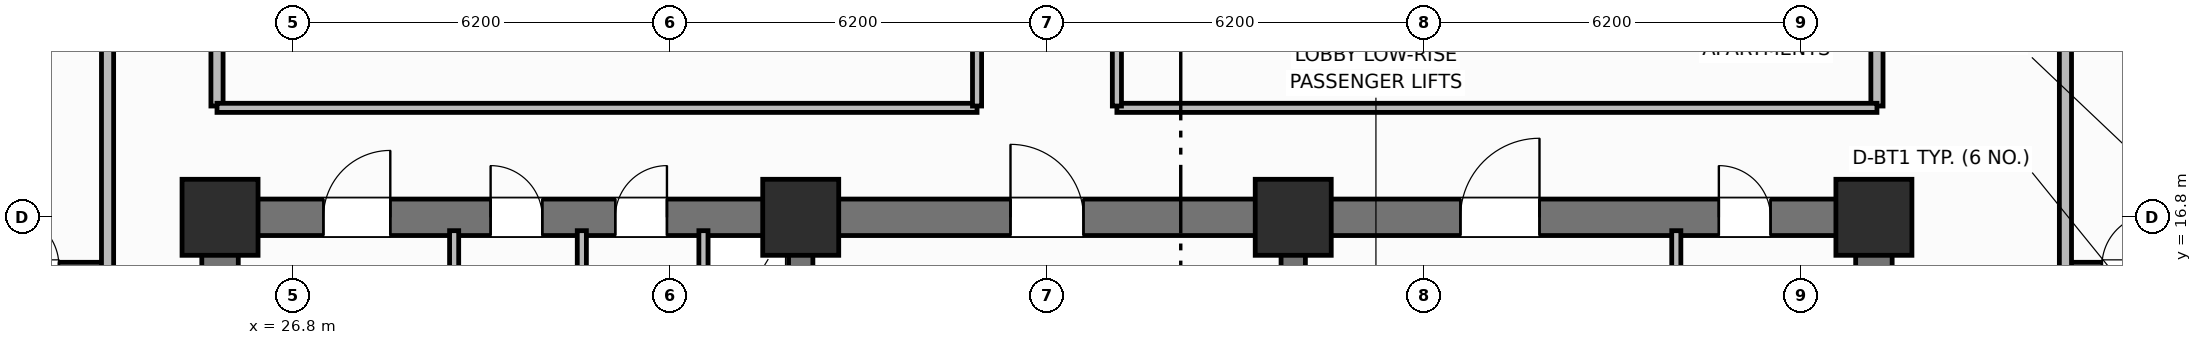
"""IFC4 building model, lengths in metres.
Left out: names, types, materials, properties, quantities, classifications, styles, units other than length and angle.
Written with IfcOpenShell. Run it as: python <this file> out.ifc"""

import sys

from ifc_helpers import new_model, si_unit, direction, frame, frame_2d, origin, origin_2d, place, context, subcontext, project, spatial, rectangle, extrude, element, fill, save


model = new_model("IFC4")
c1 = context("Model", 3, precision=1e-05, world=origin(), true_north=direction((0.0, 1.0)))
c2 = subcontext(c1, "Body", "Model", "MODEL_VIEW")
j1 = project(units=[si_unit("LENGTHUNIT", "METRE"), si_unit("PLANEANGLEUNIT", "RADIAN")], contexts=[c1])
p1 = place(None, origin())
s1 = spatial("IfcSite", under=j1, at=p1, CompositionType="ELEMENT")
p2 = place(p1, origin())
s2 = spatial("IfcBuilding", under=s1, at=p2, CompositionType="ELEMENT")
p3 = place(p2, frame((0.0, 0.0, 73.2)))
s3 = spatial("IfcBuildingStorey", under=s2, at=p3, CompositionType="ELEMENT", Elevation=73.2)
for number, where, z_axis, x_axis in (
    (1, (25.6, 10.9, 0.0), (0.0, 0.0, 1.0), (0.0, 1.0, 0.0)),
    (2, (52.8, 10.9, 0.0), (0.0, 0.0, 1.0), (0.0, 1.0, 0.0)),
):
    element("IfcWall", number, at=place(p3, frame(where, z_axis=z_axis, x_axis=x_axis)), inside=s3, PredefinedType="SHEAR", context=c2, shape_type="SweptSolid", body=[
        extrude(rectangle(XDim=5.6, YDim=0.6, at=frame_2d((2.8, 0.0))), origin(), (0.0, 0.0, 1.0), 3.7),
    ])
p4 = place(p3, frame((25.6, 16.8, 0.0), z_axis=(0.0, 0.0, 1.0), x_axis=(1.0, 0.0, 0.0)))
e3 = element("IfcWall", 3, at=p4, inside=s3, PredefinedType="SHEAR", context=c2, shape_type="SweptSolid", body=[
    extrude(rectangle(XDim=27.2, YDim=0.6, at=frame_2d((13.6, 0.0))), origin(), (0.0, 0.0, 1.0), 3.7),
])
p5 = place(p4, frame((1.7, 0.0, 0.0)))
e4 = element("IfcOpeningElement", 4, at=p5, cuts=e3, PredefinedType="OPENING", context=c2, shape_type="SweptSolid", body=[
    extrude(rectangle(XDim=1.1, YDim=2.15, at=frame_2d((0.55, 1.075))), frame((0.0, 0.31, 0.0), z_axis=(0.0, -1.0, 0.0), x_axis=(1.0, 0.0, 0.0)), (0.0, 0.0, 1.0), 0.62),
])
p6 = place(p4, frame((4.45, 0.0, 0.0)))
e5 = element("IfcOpeningElement", 5, at=p6, cuts=e3, PredefinedType="OPENING", context=c2, shape_type="SweptSolid", body=[
    extrude(rectangle(XDim=0.85, YDim=2.1, at=frame_2d((0.425, 1.05))), frame((0.0, 0.31, 0.0), z_axis=(0.0, -1.0, 0.0), x_axis=(1.0, 0.0, 0.0)), (0.0, 0.0, 1.0), 0.62),
])
p7 = place(p4, frame((6.5, 0.0, 0.0)))
e6 = element("IfcOpeningElement", 6, at=p7, cuts=e3, PredefinedType="OPENING", context=c2, shape_type="SweptSolid", body=[
    extrude(rectangle(XDim=0.85, YDim=2.1, at=frame_2d((0.425, 1.05))), frame((0.0, 0.31, 0.0), z_axis=(0.0, -1.0, 0.0), x_axis=(1.0, 0.0, 0.0)), (0.0, 0.0, 1.0), 0.62),
])
p8 = place(p4, frame((13.0, 0.0, 0.0)))
e7 = element("IfcOpeningElement", 7, at=p8, cuts=e3, PredefinedType="OPENING", context=c2, shape_type="SweptSolid", body=[
    extrude(rectangle(XDim=1.2, YDim=2.15, at=frame_2d((0.6, 1.075))), frame((0.0, 0.31, 0.0), z_axis=(0.0, -1.0, 0.0), x_axis=(1.0, 0.0, 0.0)), (0.0, 0.0, 1.0), 0.62),
])
p9 = place(p4, frame((20.4, 0.0, 0.0)))
e8 = element("IfcOpeningElement", 8, at=p9, cuts=e3, PredefinedType="OPENING", context=c2, shape_type="SweptSolid", body=[
    extrude(rectangle(XDim=1.3, YDim=2.2, at=frame_2d((0.65, 1.1))), frame((0.0, 0.31, 0.0), z_axis=(0.0, -1.0, 0.0), x_axis=(1.0, 0.0, 0.0)), (0.0, 0.0, 1.0), 0.62),
])
p10 = place(p4, frame((24.65, 0.0, 0.0)))
e9 = element("IfcOpeningElement", 9, at=p10, cuts=e3, PredefinedType="OPENING", context=c2, shape_type="SweptSolid", body=[
    extrude(rectangle(XDim=0.85, YDim=2.1, at=frame_2d((0.425, 1.05))), frame((0.0, 0.31, 0.0), z_axis=(0.0, -1.0, 0.0), x_axis=(1.0, 0.0, 0.0)), (0.0, 0.0, 1.0), 0.62),
])
for number, where, z_axis, x_axis in (
    (10, (35.15, 10.9, 0.0), (0.0, 0.0, 1.0), (0.0, 1.0, 0.0)),
    (11, (43.25, 10.9, 0.0), (0.0, 0.0, 1.0), (0.0, 1.0, 0.0)),
):
    element("IfcWall", number, at=place(p3, frame(where, z_axis=z_axis, x_axis=x_axis)), inside=s3, PredefinedType="SHEAR", context=c2, shape_type="SweptSolid", body=[
        extrude(rectangle(XDim=5.6, YDim=0.4, at=frame_2d((2.8, 0.0))), origin(), (0.0, 0.0, 1.0), 3.7),
    ])
for number, where, z_axis, x_axis in (
    (12, (25.6, 16.8, 0.0), (0.0, 0.0, 1.0), (1.0, 0.0, 0.0)),
    (13, (35.15, 16.8, 0.0), (0.0, 0.0, 1.0), (1.0, 0.0, 0.0)),
    (14, (43.25, 16.8, 0.0), (0.0, 0.0, 1.0), (1.0, 0.0, 0.0)),
    (15, (52.8, 16.8, 0.0), (0.0, 0.0, 1.0), (1.0, 0.0, 0.0)),
):
    element("IfcColumn", number, at=place(p3, frame(where, z_axis=z_axis, x_axis=x_axis)), inside=s3, PredefinedType="COLUMN", context=c2, shape_type="SweptSolid", body=[
        extrude(rectangle(XDim=1.25, YDim=1.25, at=origin_2d()), origin(), (0.0, 0.0, 1.0), 3.7),
    ])
for number, where, z_axis, x_axis in (
    (16, (29.45, 14.5, 0.0), (0.0, 0.0, 1.0), (0.0, 1.0, 0.0)),
    (17, (31.55, 14.5, 0.0), (0.0, 0.0, 1.0), (0.0, 1.0, 0.0)),
):
    element("IfcWall", number, at=place(p3, frame(where, z_axis=z_axis, x_axis=x_axis)), inside=s3, PredefinedType="PARTITIONING", context=c2, shape_type="SweptSolid", body=[
        extrude(rectangle(XDim=2.08, YDim=0.15, at=frame_2d((1.04, 0.0))), origin(), (0.0, 0.0, 1.0), 2.49),
    ])
p11 = place(p3, frame((33.55, 14.5, 0.0), z_axis=(0.0, 0.0, 1.0), x_axis=(0.0, 1.0, 0.0)))
e18 = element("IfcWall", 18, at=p11, inside=s3, PredefinedType="PARTITIONING", context=c2, shape_type="SweptSolid", body=[
    extrude(rectangle(XDim=2.08, YDim=0.15, at=frame_2d((1.04, 0.0))), origin(), (0.0, 0.0, 1.0), 2.49),
])
p12 = place(p11, frame((0.55, 0.0, 0.0)))
e19 = element("IfcOpeningElement", 19, at=p12, cuts=e18, PredefinedType="OPENING", context=c2, shape_type="SweptSolid", body=[
    extrude(rectangle(XDim=0.85, YDim=2.05, at=frame_2d((0.425, 1.025))), frame((0.0, 0.085, 0.0), z_axis=(0.0, -1.0, 0.0), x_axis=(1.0, 0.0, 0.0)), (0.0, 0.0, 1.0), 0.17),
])
p13 = place(p3, frame((49.55, 13.7, 0.0), z_axis=(0.0, 0.0, 1.0), x_axis=(0.0, 1.0, 0.0)))
e20 = element("IfcWall", 20, at=p13, inside=s3, PredefinedType="PARTITIONING", context=c2, shape_type="SweptSolid", body=[
    extrude(rectangle(XDim=2.88, YDim=0.15, at=frame_2d((1.44, 0.0))), origin(), (0.0, 0.0, 1.0), 2.49),
])
for number, where, z_axis, x_axis in (
    (21, (25.55, 18.63, 0.0), (0.0, 0.0, 1.0), (0.0, 1.0, 0.0)),
    (22, (52.85, 18.63, 0.0), (0.0, 0.0, 1.0), (0.0, 1.0, 0.0)),
):
    element("IfcWall", number, at=place(p3, frame(where, z_axis=z_axis, x_axis=x_axis)), inside=s3, PredefinedType="PARTITIONING", context=c2, shape_type="SweptSolid", body=[
        extrude(rectangle(XDim=19.14, YDim=0.2, at=frame_2d((9.57, 0.0))), origin(), (0.0, 0.0, 1.0), 2.49),
    ])
for number, where, z_axis, x_axis in (
    (23, (25.55, 18.6, 0.0), (0.0, 0.0, 1.0), (1.0, 0.0, 0.0)),
    (24, (40.35, 18.6, 0.0), (0.0, 0.0, 1.0), (1.0, 0.0, 0.0)),
):
    element("IfcWall", number, at=place(p3, frame(where, z_axis=z_axis, x_axis=x_axis)), inside=s3, PredefinedType="PARTITIONING", context=c2, shape_type="SweptSolid", body=[
        extrude(rectangle(XDim=12.5, YDim=0.15, at=frame_2d((6.25, 0.0))), origin(), (0.0, 0.0, 1.0), 2.49),
    ])
p14 = place(p3, frame((38.05, 18.63, 0.0), z_axis=(0.0, 0.0, 1.0), x_axis=(0.0, 1.0, 0.0)))
e25 = element("IfcWall", 25, at=p14, inside=s3, PredefinedType="PARTITIONING", context=c2, shape_type="SweptSolid", body=[
    extrude(rectangle(XDim=19.14, YDim=0.15, at=frame_2d((9.57, 0.0))), origin(), (0.0, 0.0, 1.0), 2.49),
])
p15 = place(p14, frame((2.2, 0.0, 0.0)))
e26 = element("IfcOpeningElement", 26, at=p15, cuts=e25, PredefinedType="OPENING", context=c2, shape_type="SweptSolid", body=[
    extrude(rectangle(XDim=1.0, YDim=2.15, at=frame_2d((0.5, 1.075))), frame((0.0, 0.085, 0.0), z_axis=(0.0, -1.0, 0.0), x_axis=(1.0, 0.0, 0.0)), (0.0, 0.0, 1.0), 0.17),
])
p16 = place(p14, frame((12.518, 0.0, 0.0)))
e27 = element("IfcOpeningElement", 27, at=p16, cuts=e25, PredefinedType="OPENING", context=c2, shape_type="SweptSolid", body=[
    extrude(rectangle(XDim=1.0, YDim=2.15, at=frame_2d((0.5, 1.075))), frame((0.0, 0.085, 0.0), z_axis=(0.0, -1.0, 0.0), x_axis=(1.0, 0.0, 0.0)), (0.0, 0.0, 1.0), 0.17),
])
p17 = place(p3, frame((40.35, 18.63, 0.0), z_axis=(0.0, 0.0, 1.0), x_axis=(0.0, 1.0, 0.0)))
e28 = element("IfcWall", 28, at=p17, inside=s3, PredefinedType="PARTITIONING", context=c2, shape_type="SweptSolid", body=[
    extrude(rectangle(XDim=19.14, YDim=0.15, at=frame_2d((9.57, 0.0))), origin(), (0.0, 0.0, 1.0), 2.49),
])
p18 = place(p17, frame((2.2, 0.0, 0.0)))
e29 = element("IfcOpeningElement", 29, at=p18, cuts=e28, PredefinedType="OPENING", context=c2, shape_type="SweptSolid", body=[
    extrude(rectangle(XDim=1.0, YDim=2.15, at=frame_2d((0.5, 1.075))), frame((0.0, 0.085, 0.0), z_axis=(0.0, -1.0, 0.0), x_axis=(1.0, 0.0, 0.0)), (0.0, 0.0, 1.0), 0.17),
])
p19 = place(p17, frame((12.518, 0.0, 0.0)))
e30 = element("IfcOpeningElement", 30, at=p19, cuts=e28, PredefinedType="OPENING", context=c2, shape_type="SweptSolid", body=[
    extrude(rectangle(XDim=0.9, YDim=2.1, at=frame_2d((0.45, 1.05))), frame((0.0, 0.085, 0.0), z_axis=(0.0, -1.0, 0.0), x_axis=(1.0, 0.0, 0.0)), (0.0, 0.0, 1.0), 0.17),
])
p20 = place(p3, frame((21.5, 16.0, 0.0), z_axis=(0.0, 0.0, 1.0), x_axis=(1.0, 0.0, 0.0)))
e31 = element("IfcWall", 31, at=p20, inside=s3, PredefinedType="PARTITIONING", context=c2, shape_type="SweptSolid", body=[
    extrude(rectangle(XDim=2.25, YDim=0.12, at=frame_2d((1.125, 0.0))), origin(), (0.0, 0.0, 1.0), 2.49),
])
p21 = place(p20, frame((0.6, 0.0, 0.0)))
e32 = element("IfcOpeningElement", 32, at=p21, cuts=e31, PredefinedType="OPENING", context=c2, shape_type="SweptSolid", body=[
    extrude(rectangle(XDim=0.85, YDim=2.1, at=frame_2d((0.425, 1.05))), frame((0.0, 0.07, 0.0), z_axis=(0.0, -1.0, 0.0), x_axis=(1.0, 0.0, 0.0)), (0.0, 0.0, 1.0), 0.14),
])
p22 = place(p3, frame((23.75, 10.6, 0.0), z_axis=(0.0, 0.0, 1.0), x_axis=(0.0, 1.0, 0.0)))
e33 = element("IfcWall", 33, at=p22, inside=s3, PredefinedType="PARTITIONING", context=c2, shape_type="SweptSolid", body=[
    extrude(rectangle(XDim=35.2, YDim=0.2, at=frame_2d((17.6, 0.0))), origin(), (0.0, 0.0, 1.0), 2.49),
])
p23 = place(p22, frame((2.65, 0.0, 0.0)))
e34 = element("IfcOpeningElement", 34, at=p23, cuts=e33, PredefinedType="OPENING", context=c2, shape_type="SweptSolid", body=[
    extrude(rectangle(XDim=1.0, YDim=2.15, at=frame_2d((0.5, 1.075))), frame((0.0, 0.11, 0.0), z_axis=(0.0, -1.0, 0.0), x_axis=(1.0, 0.0, 0.0)), (0.0, 0.0, 1.0), 0.22),
])
p24 = place(p22, frame((13.222, 0.0, 0.0)))
e35 = element("IfcOpeningElement", 35, at=p24, cuts=e33, PredefinedType="OPENING", context=c2, shape_type="SweptSolid", body=[
    extrude(rectangle(XDim=1.0, YDim=2.15, at=frame_2d((0.5, 1.075))), frame((0.0, 0.11, 0.0), z_axis=(0.0, -1.0, 0.0), x_axis=(1.0, 0.0, 0.0)), (0.0, 0.0, 1.0), 0.22),
])
p25 = place(p22, frame((25.19, 0.0, 0.0)))
e36 = element("IfcOpeningElement", 36, at=p25, cuts=e33, PredefinedType="OPENING", context=c2, shape_type="SweptSolid", body=[
    extrude(rectangle(XDim=1.0, YDim=2.15, at=frame_2d((0.5, 1.075))), frame((0.0, 0.11, 0.0), z_axis=(0.0, -1.0, 0.0), x_axis=(1.0, 0.0, 0.0)), (0.0, 0.0, 1.0), 0.22),
])
p26 = place(p3, frame((55.95, 16.0, 0.0), z_axis=(0.0, 0.0, 1.0), x_axis=(1.0, 0.0, 0.0)))
e37 = element("IfcWall", 37, at=p26, inside=s3, PredefinedType="PARTITIONING", context=c2, shape_type="SweptSolid", body=[
    extrude(rectangle(XDim=2.25, YDim=0.12, at=frame_2d((1.125, 0.0))), origin(), (0.0, 0.0, 1.0), 2.49),
])
p27 = place(p26, frame((0.6, 0.0, 0.0)))
e38 = element("IfcOpeningElement", 38, at=p27, cuts=e37, PredefinedType="OPENING", context=c2, shape_type="SweptSolid", body=[
    extrude(rectangle(XDim=0.85, YDim=2.1, at=frame_2d((0.425, 1.05))), frame((0.0, 0.07, 0.0), z_axis=(0.0, -1.0, 0.0), x_axis=(1.0, 0.0, 0.0)), (0.0, 0.0, 1.0), 0.14),
])
p28 = place(p3, frame((55.95, 10.6, 0.0), z_axis=(0.0, 0.0, 1.0), x_axis=(0.0, 1.0, 0.0)))
e39 = element("IfcWall", 39, at=p28, inside=s3, PredefinedType="PARTITIONING", context=c2, shape_type="SweptSolid", body=[
    extrude(rectangle(XDim=35.2, YDim=0.2, at=frame_2d((17.6, 0.0))), origin(), (0.0, 0.0, 1.0), 2.49),
])
p29 = place(p28, frame((2.65, 0.0, 0.0)))
e40 = element("IfcOpeningElement", 40, at=p29, cuts=e39, PredefinedType="OPENING", context=c2, shape_type="SweptSolid", body=[
    extrude(rectangle(XDim=1.0, YDim=2.15, at=frame_2d((0.5, 1.075))), frame((0.0, 0.11, 0.0), z_axis=(0.0, -1.0, 0.0), x_axis=(1.0, 0.0, 0.0)), (0.0, 0.0, 1.0), 0.22),
])
p30 = place(p28, frame((12.87, 0.0, 0.0)))
e41 = element("IfcOpeningElement", 41, at=p30, cuts=e39, PredefinedType="OPENING", context=c2, shape_type="SweptSolid", body=[
    extrude(rectangle(XDim=1.0, YDim=2.15, at=frame_2d((0.5, 1.075))), frame((0.0, 0.11, 0.0), z_axis=(0.0, -1.0, 0.0), x_axis=(1.0, 0.0, 0.0)), (0.0, 0.0, 1.0), 0.22),
])
p31 = place(p28, frame((23.65, 0.0, 0.0)))
e42 = element("IfcOpeningElement", 42, at=p31, cuts=e39, PredefinedType="OPENING", context=c2, shape_type="SweptSolid", body=[
    extrude(rectangle(XDim=1.0, YDim=2.15, at=frame_2d((0.5, 1.075))), frame((0.0, 0.11, 0.0), z_axis=(0.0, -1.0, 0.0), x_axis=(1.0, 0.0, 0.0)), (0.0, 0.0, 1.0), 0.22),
])
p32 = place(p21, origin())
e43 = element("IfcDoor", 43, at=p32, inside=s3, OperationType="SINGLE_SWING_LEFT", PredefinedType="DOOR", context=c2, shape_type="SweptSolid", body=[
    extrude(rectangle(XDim=0.85, YDim=2.1, at=frame_2d((0.425, 1.05))), frame((0.0, 0.025, 0.0), z_axis=(0.0, -1.0, 0.0), x_axis=(1.0, 0.0, 0.0)), (0.0, 0.0, 1.0), 0.05),
])
fill(e32, e43)
p33 = place(p27, origin())
e44 = element("IfcDoor", 44, at=p33, inside=s3, OperationType="SINGLE_SWING_RIGHT", PredefinedType="DOOR", context=c2, shape_type="SweptSolid", body=[
    extrude(rectangle(XDim=0.85, YDim=2.1, at=frame_2d((0.425, 1.05))), frame((0.0, 0.025, 0.0), z_axis=(0.0, -1.0, 0.0), x_axis=(1.0, 0.0, 0.0)), (0.0, 0.0, 1.0), 0.05),
])
fill(e38, e44)
p34 = place(p5, origin())
e45 = element("IfcDoor", 45, at=p34, inside=s3, OperationType="SINGLE_SWING_RIGHT", PredefinedType="DOOR", context=c2, shape_type="SweptSolid", body=[
    extrude(rectangle(XDim=1.1, YDim=2.15, at=frame_2d((0.55, 1.075))), frame((0.0, 0.025, 0.0), z_axis=(0.0, -1.0, 0.0), x_axis=(1.0, 0.0, 0.0)), (0.0, 0.0, 1.0), 0.05),
])
fill(e4, e45)
p35 = place(p6, origin())
e46 = element("IfcDoor", 46, at=p35, inside=s3, OperationType="SINGLE_SWING_LEFT", PredefinedType="DOOR", context=c2, shape_type="SweptSolid", body=[
    extrude(rectangle(XDim=0.85, YDim=2.1, at=frame_2d((0.425, 1.05))), frame((0.0, 0.025, 0.0), z_axis=(0.0, -1.0, 0.0), x_axis=(1.0, 0.0, 0.0)), (0.0, 0.0, 1.0), 0.05),
])
fill(e5, e46)
p36 = place(p7, origin())
e47 = element("IfcDoor", 47, at=p36, inside=s3, OperationType="SINGLE_SWING_RIGHT", PredefinedType="DOOR", context=c2, shape_type="SweptSolid", body=[
    extrude(rectangle(XDim=0.85, YDim=2.1, at=frame_2d((0.425, 1.05))), frame((0.0, 0.025, 0.0), z_axis=(0.0, -1.0, 0.0), x_axis=(1.0, 0.0, 0.0)), (0.0, 0.0, 1.0), 0.05),
])
fill(e6, e47)
p37 = place(p8, origin())
e48 = element("IfcDoor", 48, at=p37, inside=s3, OperationType="SINGLE_SWING_LEFT", PredefinedType="DOOR", context=c2, shape_type="SweptSolid", body=[
    extrude(rectangle(XDim=1.2, YDim=2.15, at=frame_2d((0.6, 1.075))), frame((0.0, 0.025, 0.0), z_axis=(0.0, -1.0, 0.0), x_axis=(1.0, 0.0, 0.0)), (0.0, 0.0, 1.0), 0.05),
])
fill(e7, e48)
p38 = place(p9, origin())
e49 = element("IfcDoor", 49, at=p38, inside=s3, OperationType="SINGLE_SWING_RIGHT", PredefinedType="DOOR", context=c2, shape_type="SweptSolid", body=[
    extrude(rectangle(XDim=1.3, YDim=2.2, at=frame_2d((0.65, 1.1))), frame((0.0, 0.025, 0.0), z_axis=(0.0, -1.0, 0.0), x_axis=(1.0, 0.0, 0.0)), (0.0, 0.0, 1.0), 0.05),
])
fill(e8, e49)
p39 = place(p10, origin())
e50 = element("IfcDoor", 50, at=p39, inside=s3, OperationType="SINGLE_SWING_LEFT", PredefinedType="DOOR", context=c2, shape_type="SweptSolid", body=[
    extrude(rectangle(XDim=0.85, YDim=2.1, at=frame_2d((0.425, 1.05))), frame((0.0, 0.025, 0.0), z_axis=(0.0, -1.0, 0.0), x_axis=(1.0, 0.0, 0.0)), (0.0, 0.0, 1.0), 0.05),
])
fill(e9, e50)
save(model, sys.argv[1])
